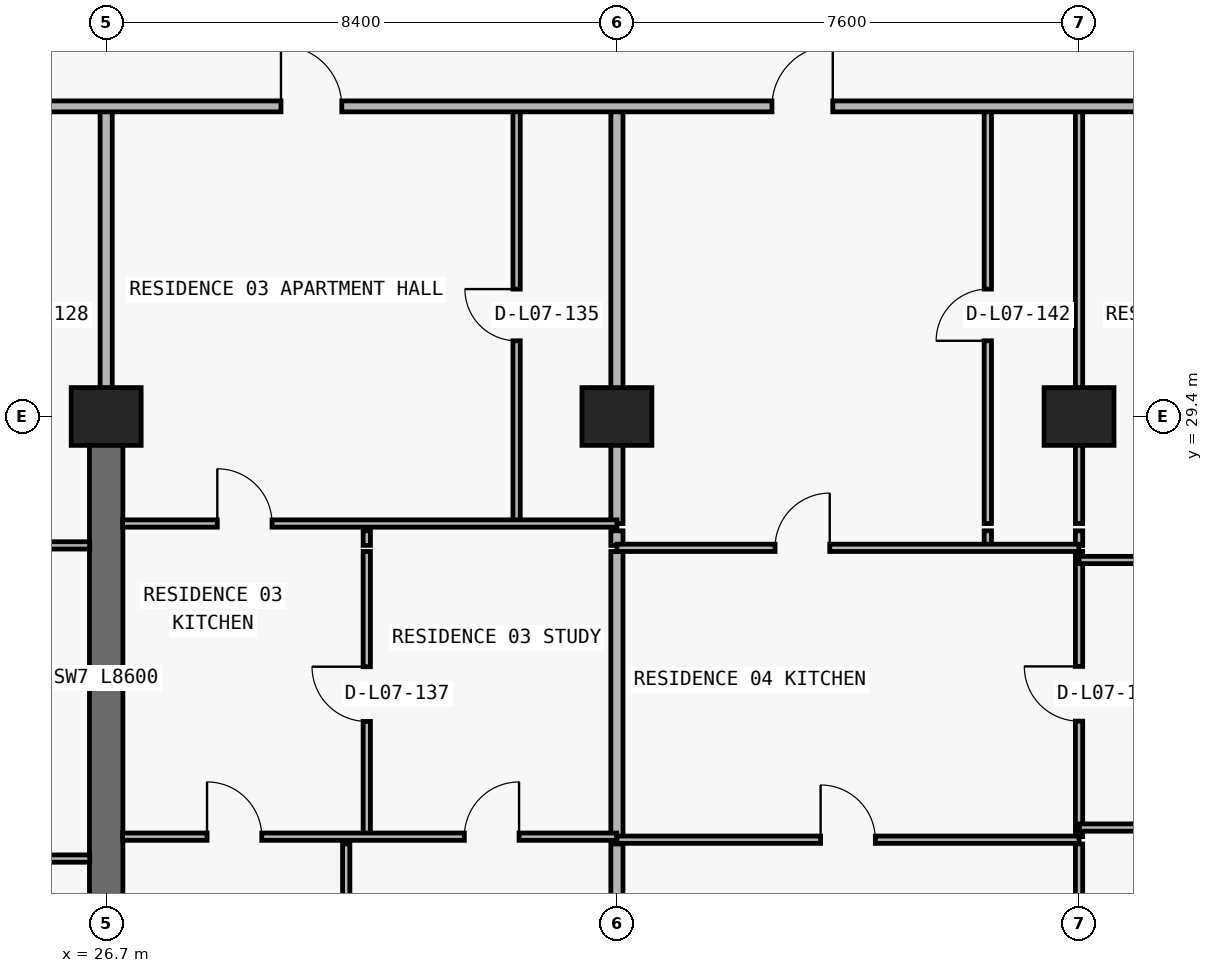
"""IFC4 building model, lengths in metres.
Left out: names, types, materials, properties, quantities, classifications, styles, units other than length and angle.
Written with IfcOpenShell. Run it as: python <this file> out.ifc"""

import sys

from ifc_helpers import new_model, si_unit, direction, frame, frame_2d, origin, origin_2d, place, context, subcontext, project, spatial, rectangle, extrude, element, fill, save


model = new_model("IFC4")
c1 = context("Model", 3, precision=1e-05, world=origin(), true_north=direction((0.0, 1.0)))
c2 = subcontext(c1, "Body", "Model", "MODEL_VIEW")
j1 = project(units=[si_unit("LENGTHUNIT", "METRE"), si_unit("PLANEANGLEUNIT", "RADIAN")], contexts=[c1])
p1 = place(None, origin())
s1 = spatial("IfcSite", under=j1, at=p1, CompositionType="ELEMENT")
p2 = place(p1, origin())
s2 = spatial("IfcBuilding", under=s1, at=p2, CompositionType="ELEMENT")
p3 = place(p2, frame((0.0, 0.0, 33.3)))
s3 = spatial("IfcBuildingStorey", under=s2, at=p3, CompositionType="ELEMENT", Elevation=33.3)
for number, where, z_axis, x_axis in (
    (1, (26.7, 29.4, 0.0), (0.0, 0.0, 1.0), (1.0, 0.0, 0.0)),
    (2, (35.1, 29.4, 0.0), (0.0, 0.0, 1.0), (1.0, 0.0, 0.0)),
    (3, (42.7, 29.4, 0.0), (0.0, 0.0, 1.0), (1.0, 0.0, 0.0)),
):
    element("IfcColumn", number, at=place(p3, frame(where, z_axis=z_axis, x_axis=x_axis)), inside=s3, PredefinedType="COLUMN", context=c2, shape_type="SweptSolid", body=[
        extrude(rectangle(XDim=1.15, YDim=0.95, at=origin_2d()), origin(), (0.0, 0.0, 1.0), 3.05),
    ])
p4 = place(p3, frame((26.7, 20.8, 0.0), z_axis=(0.0, 0.0, 1.0), x_axis=(0.0, 1.0, 0.0)))
e4 = element("IfcWall", 4, at=p4, inside=s3, PredefinedType="SHEAR", context=c2, shape_type="SweptSolid", body=[
    extrude(rectangle(XDim=8.6, YDim=0.55, at=frame_2d((4.3, 0.0))), origin(), (0.0, 0.0, 1.0), 3.05),
])
p5 = place(p3, frame((26.7, 29.405, 0.0), z_axis=(0.0, 0.0, 1.0), x_axis=(0.0, 1.0, 0.0)))
e5 = element("IfcWall", 5, at=p5, inside=s3, PredefinedType="PARTITIONING", context=c2, shape_type="SweptSolid", body=[
    extrude(rectangle(XDim=5.095, YDim=0.2, at=frame_2d((2.547, 0.0))), origin(), (0.0, 0.0, 1.0), 2.335),
])
p6 = place(p3, frame((30.648, 6.24, 0.0), z_axis=(0.0, 0.0, 1.0), x_axis=(0.0, 1.0, 0.0)))
e6 = element("IfcWall", 6, at=p6, inside=s3, PredefinedType="PARTITIONING", context=c2, shape_type="SweptSolid", body=[
    extrude(rectangle(XDim=16.13, YDim=0.12, at=frame_2d((8.065, 0.0))), origin(), (0.0, 0.0, 1.0), 3.05),
])
p7 = place(p3, frame((30.986, 22.49, 0.0), z_axis=(0.0, 0.0, 1.0), x_axis=(0.0, 1.0, 0.0)))
e7 = element("IfcWall", 7, at=p7, inside=s3, PredefinedType="PARTITIONING", context=c2, shape_type="SweptSolid", body=[
    extrude(rectangle(XDim=4.69, YDim=0.12, at=frame_2d((2.345, 0.0))), origin(), (0.0, 0.0, 1.0), 3.05),
])
p8 = place(p7, frame((1.895, 0.0, 0.0)))
e8 = element("IfcOpeningElement", 8, at=p8, cuts=e7, PredefinedType="OPENING", context=c2, shape_type="SweptSolid", body=[
    extrude(rectangle(XDim=0.9, YDim=2.15, at=frame_2d((0.45, 1.075))), frame((0.0, 0.07, 0.0), z_axis=(0.0, -1.0, 0.0), x_axis=(1.0, 0.0, 0.0)), (0.0, 0.0, 1.0), 0.14),
])
p9 = place(p3, frame((30.986, 27.28, 0.0), z_axis=(0.0, 0.0, 1.0), x_axis=(0.0, 1.0, 0.0)))
e9 = element("IfcWall", 9, at=p9, inside=s3, PredefinedType="PARTITIONING", context=c2, shape_type="SweptSolid", body=[
    extrude(rectangle(XDim=0.24, YDim=0.12, at=frame_2d((0.12, 0.0))), origin(), (0.0, 0.0, 1.0), 3.05),
])
p10 = place(p3, frame((33.45, 27.64, 0.0), z_axis=(0.0, 0.0, 1.0), x_axis=(0.0, 1.0, 0.0)))
e10 = element("IfcWall", 10, at=p10, inside=s3, PredefinedType="PARTITIONING", context=c2, shape_type="SweptSolid", body=[
    extrude(rectangle(XDim=6.86, YDim=0.12, at=frame_2d((3.43, 0.0))), origin(), (0.0, 0.0, 1.0), 3.05),
])
p11 = place(p10, frame((3.005, 0.0, 0.0)))
e11 = element("IfcOpeningElement", 11, at=p11, cuts=e10, PredefinedType="OPENING", context=c2, shape_type="SweptSolid", body=[
    extrude(rectangle(XDim=0.85, YDim=2.1, at=frame_2d((0.425, 1.05))), frame((0.0, 0.07, 0.0), z_axis=(0.0, -1.0, 0.0), x_axis=(1.0, 0.0, 0.0)), (0.0, 0.0, 1.0), 0.14),
])
p12 = place(p3, frame((35.1, 6.24, 0.0), z_axis=(0.0, 0.0, 1.0), x_axis=(0.0, 1.0, 0.0)))
e12 = element("IfcWall", 12, at=p12, inside=s3, PredefinedType="PARTITIONING", context=c2, shape_type="SweptSolid", body=[
    extrude(rectangle(XDim=16.13, YDim=0.2, at=frame_2d((8.065, 0.0))), origin(), (0.0, 0.0, 1.0), 2.11),
])
p13 = place(p3, frame((35.1, 22.49, 0.0), z_axis=(0.0, 0.0, 1.0), x_axis=(0.0, 1.0, 0.0)))
e13 = element("IfcWall", 13, at=p13, inside=s3, PredefinedType="PARTITIONING", context=c2, shape_type="SweptSolid", body=[
    extrude(rectangle(XDim=4.69, YDim=0.2, at=frame_2d((2.345, 0.0))), origin(), (0.0, 0.0, 1.0), 2.11),
])
p14 = place(p3, frame((35.1, 27.28, 0.0), z_axis=(0.0, 0.0, 1.0), x_axis=(0.0, 1.0, 0.0)))
e14 = element("IfcWall", 14, at=p14, inside=s3, PredefinedType="PARTITIONING", context=c2, shape_type="SweptSolid", body=[
    extrude(rectangle(XDim=0.24, YDim=0.2, at=frame_2d((0.12, 0.0))), origin(), (0.0, 0.0, 1.0), 2.11),
])
p15 = place(p3, frame((35.1, 27.64, 0.0), z_axis=(0.0, 0.0, 1.0), x_axis=(0.0, 1.0, 0.0)))
e15 = element("IfcWall", 15, at=p15, inside=s3, PredefinedType="PARTITIONING", context=c2, shape_type="SweptSolid", body=[
    extrude(rectangle(XDim=6.86, YDim=0.2, at=frame_2d((3.43, 0.0))), origin(), (0.0, 0.0, 1.0), 2.11),
])
p16 = place(p3, frame((41.2, 27.28, 0.0), z_axis=(0.0, 0.0, 1.0), x_axis=(0.0, 1.0, 0.0)))
e16 = element("IfcWall", 16, at=p16, inside=s3, PredefinedType="PARTITIONING", context=c2, shape_type="SweptSolid", body=[
    extrude(rectangle(XDim=0.24, YDim=0.12, at=frame_2d((0.12, 0.0))), origin(), (0.0, 0.0, 1.0), 3.05),
])
p17 = place(p3, frame((41.2, 27.64, 0.0), z_axis=(0.0, 0.0, 1.0), x_axis=(0.0, 1.0, 0.0)))
e17 = element("IfcWall", 17, at=p17, inside=s3, PredefinedType="PARTITIONING", context=c2, shape_type="SweptSolid", body=[
    extrude(rectangle(XDim=6.86, YDim=0.12, at=frame_2d((3.43, 0.0))), origin(), (0.0, 0.0, 1.0), 3.05),
])
p18 = place(p17, frame((3.005, 0.0, 0.0)))
e18 = element("IfcOpeningElement", 18, at=p18, cuts=e17, PredefinedType="OPENING", context=c2, shape_type="SweptSolid", body=[
    extrude(rectangle(XDim=0.85, YDim=2.1, at=frame_2d((0.425, 1.05))), frame((0.0, 0.07, 0.0), z_axis=(0.0, -1.0, 0.0), x_axis=(1.0, 0.0, 0.0)), (0.0, 0.0, 1.0), 0.14),
])
p19 = place(p3, frame((42.7, 6.24, 0.0), z_axis=(0.0, 0.0, 1.0), x_axis=(0.0, 1.0, 0.0)))
e19 = element("IfcWall", 19, at=p19, inside=s3, PredefinedType="PARTITIONING", context=c2, shape_type="SweptSolid", body=[
    extrude(rectangle(XDim=16.13, YDim=0.12, at=frame_2d((8.065, 0.0))), origin(), (0.0, 0.0, 1.0), 2.11),
])
p20 = place(p3, frame((42.7, 22.49, 0.0), z_axis=(0.0, 0.0, 1.0), x_axis=(0.0, 1.0, 0.0)))
e20 = element("IfcWall", 20, at=p20, inside=s3, PredefinedType="PARTITIONING", context=c2, shape_type="SweptSolid", body=[
    extrude(rectangle(XDim=4.69, YDim=0.12, at=frame_2d((2.345, 0.0))), origin(), (0.0, 0.0, 1.0), 2.11),
])
p21 = place(p20, frame((1.9, 0.0, 0.0)))
e21 = element("IfcOpeningElement", 21, at=p21, cuts=e20, PredefinedType="OPENING", context=c2, shape_type="SweptSolid", body=[
    extrude(rectangle(XDim=0.9, YDim=2.06, at=frame_2d((0.45, 1.03))), frame((0.0, 0.07, 0.0), z_axis=(0.0, -1.0, 0.0), x_axis=(1.0, 0.0, 0.0)), (0.0, 0.0, 1.0), 0.14),
])
p22 = place(p3, frame((42.7, 27.28, 0.0), z_axis=(0.0, 0.0, 1.0), x_axis=(0.0, 1.0, 0.0)))
e22 = element("IfcWall", 22, at=p22, inside=s3, PredefinedType="PARTITIONING", context=c2, shape_type="SweptSolid", body=[
    extrude(rectangle(XDim=0.24, YDim=0.12, at=frame_2d((0.12, 0.0))), origin(), (0.0, 0.0, 1.0), 2.11),
])
p23 = place(p3, frame((42.7, 27.64, 0.0), z_axis=(0.0, 0.0, 1.0), x_axis=(0.0, 1.0, 0.0)))
e23 = element("IfcWall", 23, at=p23, inside=s3, PredefinedType="PARTITIONING", context=c2, shape_type="SweptSolid", body=[
    extrude(rectangle(XDim=6.86, YDim=0.12, at=frame_2d((3.43, 0.0))), origin(), (0.0, 0.0, 1.0), 2.11),
])
p24 = place(p3, frame((18.3, 22.13, 0.0), z_axis=(0.0, 0.0, 1.0), x_axis=(1.0, 0.0, 0.0)))
e24 = element("IfcWall", 24, at=p24, inside=s3, PredefinedType="PARTITIONING", context=c2, shape_type="SweptSolid", body=[
    extrude(rectangle(XDim=8.13, YDim=0.12, at=frame_2d((4.065, 0.0))), origin(), (0.0, 0.0, 1.0), 3.05),
])
p25 = place(p24, frame((1.86, 0.0, 0.0)))
e25 = element("IfcOpeningElement", 25, at=p25, cuts=e24, PredefinedType="OPENING", context=c2, shape_type="SweptSolid", body=[
    extrude(rectangle(XDim=0.9, YDim=2.15, at=frame_2d((0.45, 1.075))), frame((0.0, 0.07, 0.0), z_axis=(0.0, -1.0, 0.0), x_axis=(1.0, 0.0, 0.0)), (0.0, 0.0, 1.0), 0.14),
])
p26 = place(p24, frame((6.008, 0.0, 0.0)))
e26 = element("IfcOpeningElement", 26, at=p26, cuts=e24, PredefinedType="OPENING", context=c2, shape_type="SweptSolid", body=[
    extrude(rectangle(XDim=0.9, YDim=2.15, at=frame_2d((0.45, 1.075))), frame((0.0, 0.07, 0.0), z_axis=(0.0, -1.0, 0.0), x_axis=(1.0, 0.0, 0.0)), (0.0, 0.0, 1.0), 0.14),
])
p27 = place(p3, frame((35.1, 22.44, 0.0), z_axis=(0.0, 0.0, 1.0), x_axis=(1.0, 0.0, 0.0)))
e27 = element("IfcWall", 27, at=p27, inside=s3, PredefinedType="PARTITIONING", context=c2, shape_type="SweptSolid", body=[
    extrude(rectangle(XDim=7.6, YDim=0.12, at=frame_2d((3.8, 0.0))), origin(), (0.0, 0.0, 1.0), 3.05),
])
p28 = place(p27, frame((3.35, 0.0, 0.0)))
e28 = element("IfcOpeningElement", 28, at=p28, cuts=e27, PredefinedType="OPENING", context=c2, shape_type="SweptSolid", body=[
    extrude(rectangle(XDim=0.9, YDim=2.15, at=frame_2d((0.45, 1.075))), frame((0.0, 0.07, 0.0), z_axis=(0.0, -1.0, 0.0), x_axis=(1.0, 0.0, 0.0)), (0.0, 0.0, 1.0), 0.14),
])
p29 = place(p3, frame((26.97, 22.49, 0.0), z_axis=(0.0, 0.0, 1.0), x_axis=(1.0, 0.0, 0.0)))
e29 = element("IfcWall", 29, at=p29, inside=s3, PredefinedType="PARTITIONING", context=c2, shape_type="SweptSolid", body=[
    extrude(rectangle(XDim=8.125, YDim=0.12, at=frame_2d((4.062, 0.0))), origin(), (0.0, 0.0, 1.0), 3.05),
])
p30 = place(p29, frame((1.389, 0.0, 0.0)))
e30 = element("IfcOpeningElement", 30, at=p30, cuts=e29, PredefinedType="OPENING", context=c2, shape_type="SweptSolid", body=[
    extrude(rectangle(XDim=0.9, YDim=2.15, at=frame_2d((0.45, 1.075))), frame((0.0, 0.07, 0.0), z_axis=(0.0, -1.0, 0.0), x_axis=(1.0, 0.0, 0.0)), (0.0, 0.0, 1.0), 0.14),
])
p31 = place(p29, frame((5.621, 0.0, 0.0)))
e31 = element("IfcOpeningElement", 31, at=p31, cuts=e29, PredefinedType="OPENING", context=c2, shape_type="SweptSolid", body=[
    extrude(rectangle(XDim=0.9, YDim=2.15, at=frame_2d((0.45, 1.075))), frame((0.0, 0.07, 0.0), z_axis=(0.0, -1.0, 0.0), x_axis=(1.0, 0.0, 0.0)), (0.0, 0.0, 1.0), 0.14),
])
p32 = place(p3, frame((42.705, 22.64, 0.0), z_axis=(0.0, 0.0, 1.0), x_axis=(1.0, 0.0, 0.0)))
e32 = element("IfcWall", 32, at=p32, inside=s3, PredefinedType="PARTITIONING", context=c2, shape_type="SweptSolid", body=[
    extrude(rectangle(XDim=8.125, YDim=0.12, at=frame_2d((4.062, 0.0))), origin(), (0.0, 0.0, 1.0), 3.05),
])
p33 = place(p32, frame((3.613, 0.0, 0.0)))
e33 = element("IfcOpeningElement", 33, at=p33, cuts=e32, PredefinedType="OPENING", context=c2, shape_type="SweptSolid", body=[
    extrude(rectangle(XDim=0.9, YDim=2.15, at=frame_2d((0.45, 1.075))), frame((0.0, 0.07, 0.0), z_axis=(0.0, -1.0, 0.0), x_axis=(1.0, 0.0, 0.0)), (0.0, 0.0, 1.0), 0.14),
])
p34 = place(p3, frame((42.7, 27.04, 0.0), z_axis=(0.0, 0.0, 1.0), x_axis=(1.0, 0.0, 0.0)))
e34 = element("IfcWall", 34, at=p34, inside=s3, PredefinedType="PARTITIONING", context=c2, shape_type="SweptSolid", body=[
    extrude(rectangle(XDim=8.13, YDim=0.12, at=frame_2d((4.065, 0.0))), origin(), (0.0, 0.0, 1.0), 3.05),
])
p35 = place(p34, frame((3.0, 0.0, 0.0)))
e35 = element("IfcOpeningElement", 35, at=p35, cuts=e34, PredefinedType="OPENING", context=c2, shape_type="SweptSolid", body=[
    extrude(rectangle(XDim=0.9, YDim=2.15, at=frame_2d((0.45, 1.075))), frame((0.0, 0.07, 0.0), z_axis=(0.0, -1.0, 0.0), x_axis=(1.0, 0.0, 0.0)), (0.0, 0.0, 1.0), 0.14),
])
p36 = place(p3, frame((35.1, 27.24, 0.0), z_axis=(0.0, 0.0, 1.0), x_axis=(1.0, 0.0, 0.0)))
e36 = element("IfcWall", 36, at=p36, inside=s3, PredefinedType="PARTITIONING", context=c2, shape_type="SweptSolid", body=[
    extrude(rectangle(XDim=7.595, YDim=0.12, at=frame_2d((3.797, 0.0))), origin(), (0.0, 0.0, 1.0), 3.05),
])
p37 = place(p36, frame((2.6, 0.0, 0.0)))
e37 = element("IfcOpeningElement", 37, at=p37, cuts=e36, PredefinedType="OPENING", context=c2, shape_type="SweptSolid", body=[
    extrude(rectangle(XDim=0.9, YDim=2.15, at=frame_2d((0.45, 1.075))), frame((0.0, 0.07, 0.0), z_axis=(0.0, -1.0, 0.0), x_axis=(1.0, 0.0, 0.0)), (0.0, 0.0, 1.0), 0.14),
])
p38 = place(p3, frame((18.3, 27.28, 0.0), z_axis=(0.0, 0.0, 1.0), x_axis=(1.0, 0.0, 0.0)))
e38 = element("IfcWall", 38, at=p38, inside=s3, PredefinedType="PARTITIONING", context=c2, shape_type="SweptSolid", body=[
    extrude(rectangle(XDim=8.13, YDim=0.12, at=frame_2d((4.065, 0.0))), origin(), (0.0, 0.0, 1.0), 3.05),
])
p39 = place(p38, frame((1.943, 0.0, 0.0)))
e39 = element("IfcOpeningElement", 39, at=p39, cuts=e38, PredefinedType="OPENING", context=c2, shape_type="SweptSolid", body=[
    extrude(rectangle(XDim=0.9, YDim=2.15, at=frame_2d((0.45, 1.075))), frame((0.0, 0.07, 0.0), z_axis=(0.0, -1.0, 0.0), x_axis=(1.0, 0.0, 0.0)), (0.0, 0.0, 1.0), 0.14),
])
p40 = place(p3, frame((26.97, 27.64, 0.0), z_axis=(0.0, 0.0, 1.0), x_axis=(1.0, 0.0, 0.0)))
e40 = element("IfcWall", 40, at=p40, inside=s3, PredefinedType="PARTITIONING", context=c2, shape_type="SweptSolid", body=[
    extrude(rectangle(XDim=8.13, YDim=0.12, at=frame_2d((4.065, 0.0))), origin(), (0.0, 0.0, 1.0), 3.05),
])
p41 = place(p40, frame((1.558, 0.0, 0.0)))
e41 = element("IfcOpeningElement", 41, at=p41, cuts=e40, PredefinedType="OPENING", context=c2, shape_type="SweptSolid", body=[
    extrude(rectangle(XDim=0.9, YDim=2.15, at=frame_2d((0.45, 1.075))), frame((0.0, 0.07, 0.0), z_axis=(0.0, -1.0, 0.0), x_axis=(1.0, 0.0, 0.0)), (0.0, 0.0, 1.0), 0.14),
])
p42 = place(p3, frame((5.105, 34.5, 0.0), z_axis=(0.0, 0.0, 1.0), x_axis=(1.0, 0.0, 0.0)))
e42 = element("IfcWall", 42, at=p42, inside=s3, PredefinedType="PARTITIONING", context=c2, shape_type="SweptSolid", body=[
    extrude(rectangle(XDim=50.781, YDim=0.18, at=frame_2d((25.391, 0.0))), origin(), (0.0, 0.0, 1.0), 3.05),
])
p43 = place(p42, frame((7.67, 0.0, 0.0)))
e43 = element("IfcOpeningElement", 43, at=p43, cuts=e42, PredefinedType="OPENING", context=c2, shape_type="SweptSolid", body=[
    extrude(rectangle(XDim=1.0, YDim=2.2, at=frame_2d((0.5, 1.1))), frame((0.0, 0.1, 0.0), z_axis=(0.0, -1.0, 0.0), x_axis=(1.0, 0.0, 0.0)), (0.0, 0.0, 1.0), 0.2),
])
p44 = place(p42, frame((16.07, 0.0, 0.0)))
e44 = element("IfcOpeningElement", 44, at=p44, cuts=e42, PredefinedType="OPENING", context=c2, shape_type="SweptSolid", body=[
    extrude(rectangle(XDim=1.0, YDim=2.2, at=frame_2d((0.5, 1.1))), frame((0.0, 0.1, 0.0), z_axis=(0.0, -1.0, 0.0), x_axis=(1.0, 0.0, 0.0)), (0.0, 0.0, 1.0), 0.2),
])
p45 = place(p42, frame((24.47, 0.0, 0.0)))
e45 = element("IfcOpeningElement", 45, at=p45, cuts=e42, PredefinedType="OPENING", context=c2, shape_type="SweptSolid", body=[
    extrude(rectangle(XDim=1.0, YDim=2.2, at=frame_2d((0.5, 1.1))), frame((0.0, 0.1, 0.0), z_axis=(0.0, -1.0, 0.0), x_axis=(1.0, 0.0, 0.0)), (0.0, 0.0, 1.0), 0.2),
])
p46 = place(p42, frame((32.545, 0.0, 0.0)))
e46 = element("IfcOpeningElement", 46, at=p46, cuts=e42, PredefinedType="OPENING", context=c2, shape_type="SweptSolid", body=[
    extrude(rectangle(XDim=1.0, YDim=2.2, at=frame_2d((0.5, 1.1))), frame((0.0, 0.1, 0.0), z_axis=(0.0, -1.0, 0.0), x_axis=(1.0, 0.0, 0.0)), (0.0, 0.0, 1.0), 0.2),
])
p47 = place(p42, frame((47.888, 0.0, 0.0)))
e47 = element("IfcOpeningElement", 47, at=p47, cuts=e42, PredefinedType="OPENING", context=c2, shape_type="SweptSolid", body=[
    extrude(rectangle(XDim=1.0, YDim=2.2, at=frame_2d((0.5, 1.1))), frame((0.0, 0.1, 0.0), z_axis=(0.0, -1.0, 0.0), x_axis=(1.0, 0.0, 0.0)), (0.0, 0.0, 1.0), 0.2),
])
p48 = place(p45, origin())
e48 = element("IfcDoor", 48, at=p48, inside=s3, OperationType="SINGLE_SWING_LEFT", PredefinedType="DOOR", context=c2, shape_type="SweptSolid", body=[
    extrude(rectangle(XDim=1.0, YDim=2.2, at=frame_2d((0.5, 1.1))), frame((0.0, 0.025, 0.0), z_axis=(0.0, -1.0, 0.0), x_axis=(1.0, 0.0, 0.0)), (0.0, 0.0, 1.0), 0.05),
])
fill(e45, e48)
p49 = place(p11, origin())
e49 = element("IfcDoor", 49, at=p49, inside=s3, OperationType="SINGLE_SWING_RIGHT", PredefinedType="DOOR", context=c2, shape_type="SweptSolid", body=[
    extrude(rectangle(XDim=0.85, YDim=2.1, at=frame_2d((0.425, 1.05))), frame((0.0, 0.025, 0.0), z_axis=(0.0, -1.0, 0.0), x_axis=(1.0, 0.0, 0.0)), (0.0, 0.0, 1.0), 0.05),
])
fill(e11, e49)
p50 = place(p41, origin())
e50 = element("IfcDoor", 50, at=p50, inside=s3, OperationType="SINGLE_SWING_LEFT", PredefinedType="DOOR", context=c2, shape_type="SweptSolid", body=[
    extrude(rectangle(XDim=0.9, YDim=2.15, at=frame_2d((0.45, 1.075))), frame((0.0, 0.025, 0.0), z_axis=(0.0, -1.0, 0.0), x_axis=(1.0, 0.0, 0.0)), (0.0, 0.0, 1.0), 0.05),
])
fill(e41, e50)
p51 = place(p8, origin())
e51 = element("IfcDoor", 51, at=p51, inside=s3, OperationType="SINGLE_SWING_RIGHT", PredefinedType="DOOR", context=c2, shape_type="SweptSolid", body=[
    extrude(rectangle(XDim=0.9, YDim=2.15, at=frame_2d((0.45, 1.075))), frame((0.0, 0.025, 0.0), z_axis=(0.0, -1.0, 0.0), x_axis=(1.0, 0.0, 0.0)), (0.0, 0.0, 1.0), 0.05),
])
fill(e8, e51)
p52 = place(p30, origin())
e52 = element("IfcDoor", 52, at=p52, inside=s3, OperationType="SINGLE_SWING_LEFT", PredefinedType="DOOR", context=c2, shape_type="SweptSolid", body=[
    extrude(rectangle(XDim=0.9, YDim=2.15, at=frame_2d((0.45, 1.075))), frame((0.0, 0.025, 0.0), z_axis=(0.0, -1.0, 0.0), x_axis=(1.0, 0.0, 0.0)), (0.0, 0.0, 1.0), 0.05),
])
fill(e30, e52)
p53 = place(p31, origin())
e53 = element("IfcDoor", 53, at=p53, inside=s3, OperationType="SINGLE_SWING_RIGHT", PredefinedType="DOOR", context=c2, shape_type="SweptSolid", body=[
    extrude(rectangle(XDim=0.9, YDim=2.15, at=frame_2d((0.45, 1.075))), frame((0.0, 0.025, 0.0), z_axis=(0.0, -1.0, 0.0), x_axis=(1.0, 0.0, 0.0)), (0.0, 0.0, 1.0), 0.05),
])
fill(e31, e53)
p54 = place(p46, origin())
e54 = element("IfcDoor", 54, at=p54, inside=s3, OperationType="SINGLE_SWING_RIGHT", PredefinedType="DOOR", context=c2, shape_type="SweptSolid", body=[
    extrude(rectangle(XDim=1.0, YDim=2.2, at=frame_2d((0.5, 1.1))), frame((0.0, 0.025, 0.0), z_axis=(0.0, -1.0, 0.0), x_axis=(1.0, 0.0, 0.0)), (0.0, 0.0, 1.0), 0.05),
])
fill(e46, e54)
p55 = place(p18, origin())
e55 = element("IfcDoor", 55, at=p55, inside=s3, OperationType="SINGLE_SWING_LEFT", PredefinedType="DOOR", context=c2, shape_type="SweptSolid", body=[
    extrude(rectangle(XDim=0.85, YDim=2.1, at=frame_2d((0.425, 1.05))), frame((0.0, 0.025, 0.0), z_axis=(0.0, -1.0, 0.0), x_axis=(1.0, 0.0, 0.0)), (0.0, 0.0, 1.0), 0.05),
])
fill(e18, e55)
p56 = place(p37, origin())
e56 = element("IfcDoor", 56, at=p56, inside=s3, OperationType="SINGLE_SWING_RIGHT", PredefinedType="DOOR", context=c2, shape_type="SweptSolid", body=[
    extrude(rectangle(XDim=0.9, YDim=2.15, at=frame_2d((0.45, 1.075))), frame((0.0, 0.025, 0.0), z_axis=(0.0, -1.0, 0.0), x_axis=(1.0, 0.0, 0.0)), (0.0, 0.0, 1.0), 0.05),
])
fill(e37, e56)
p57 = place(p28, origin())
e57 = element("IfcDoor", 57, at=p57, inside=s3, OperationType="SINGLE_SWING_LEFT", PredefinedType="DOOR", context=c2, shape_type="SweptSolid", body=[
    extrude(rectangle(XDim=0.9, YDim=2.15, at=frame_2d((0.45, 1.075))), frame((0.0, 0.025, 0.0), z_axis=(0.0, -1.0, 0.0), x_axis=(1.0, 0.0, 0.0)), (0.0, 0.0, 1.0), 0.05),
])
fill(e28, e57)
p58 = place(p21, origin())
e58 = element("IfcDoor", 58, at=p58, inside=s3, OperationType="SINGLE_SWING_RIGHT", PredefinedType="DOOR", context=c2, shape_type="SweptSolid", body=[
    extrude(rectangle(XDim=0.9, YDim=2.06, at=frame_2d((0.45, 1.03))), frame((0.0, 0.025, 0.0), z_axis=(0.0, -1.0, 0.0), x_axis=(1.0, 0.0, 0.0)), (0.0, 0.0, 1.0), 0.05),
])
fill(e21, e58)
save(model, sys.argv[1])
